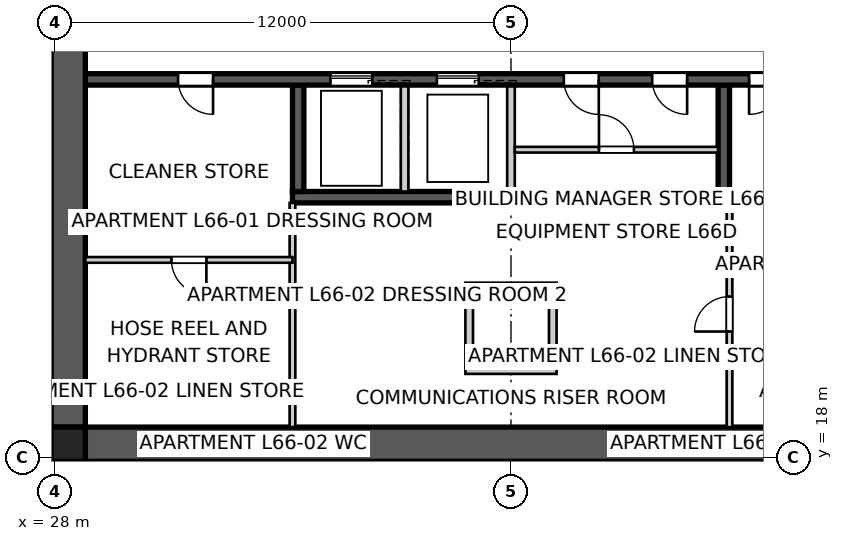
"""IFC4 building model, lengths in metres.
Left out: names, types, materials, properties, quantities, classifications, styles, units other than length and angle.
Written with IfcOpenShell. Run it as: python <this file> out.ifc"""

import sys

from ifc_helpers import new_model, si_unit, direction, frame, frame_2d, origin, origin_2d, place, context, subcontext, project, spatial, polyline, rectangle, outline, extrude, element, fill, save


model = new_model("IFC4")
c1 = context("Model", 3, precision=1e-05, world=origin(), true_north=direction((0.0, 1.0)))
c2 = subcontext(c1, "Body", "Model", "MODEL_VIEW")
j1 = project(units=[si_unit("LENGTHUNIT", "METRE"), si_unit("PLANEANGLEUNIT", "RADIAN")], contexts=[c1])
p1 = place(None, origin())
s1 = spatial("IfcSite", under=j1, at=p1, CompositionType="ELEMENT")
p2 = place(p1, origin())
s2 = spatial("IfcBuilding", under=s1, at=p2, CompositionType="ELEMENT")
p3 = place(p2, frame((0.0, 0.0, 240.4)))
s3 = spatial("IfcBuildingStorey", under=s2, at=p3, CompositionType="ELEMENT", Elevation=240.4)
p4 = place(p3, frame((51.2, 18.35, 0.0), z_axis=(0.0, 0.0, 1.0), x_axis=(-1.0, 0.0, 0.0)))
e1 = element("IfcWall", 1, at=p4, inside=s3, PredefinedType="SHEAR", context=c2, shape_type="SweptSolid", body=[
    extrude(outline(polyline([(0.0, -0.45), (22.4, -0.45), (22.4, -0.025), (22.85, -0.025), (22.85, 0.025), (22.4, 0.025), (22.4, 0.45), (0.0, 0.45), (0.0, 0.025), (-0.45, 0.025), (-0.45, -0.025), (0.0, -0.025), (0.0, -0.45)])), origin(), (0.0, 0.0, 1.0), 3.4),
])
p5 = place(p3, frame((28.35, 41.2, 0.0), z_axis=(0.0, 0.0, 1.0), x_axis=(0.0, -1.0, 0.0)))
e2 = element("IfcWall", 2, at=p5, inside=s3, PredefinedType="SHEAR", context=c2, shape_type="SweptSolid", body=[
    extrude(outline(polyline([(0.0, -0.45), (22.4, -0.45), (22.4, -0.025), (22.85, -0.025), (22.85, 0.025), (22.4, 0.025), (22.4, 0.45), (0.0, 0.45), (0.0, 0.025), (-0.45, 0.025), (-0.45, -0.025), (0.0, -0.025), (0.0, -0.45)])), origin(), (0.0, 0.0, 1.0), 3.4),
])
p6 = place(p5, frame((11.14, 0.0, 0.0)))
e3 = element("IfcOpeningElement", 3, at=p6, cuts=e2, PredefinedType="OPENING", context=c2, shape_type="SweptSolid", body=[
    extrude(rectangle(XDim=1.02, YDim=2.4, at=frame_2d((0.51, 1.2))), frame((0.0, 0.46, 0.0), z_axis=(0.0, -1.0, 0.0), x_axis=(1.0, 0.0, 0.0)), (0.0, 0.0, 1.0), 0.92),
])
p7 = place(p3, frame((51.2, 27.95, 0.0), z_axis=(0.0, 0.0, 1.0), x_axis=(-1.0, 0.0, 0.0)))
e4 = element("IfcWall", 4, at=p7, inside=s3, PredefinedType="SHEAR", context=c2, shape_type="SweptSolid", body=[
    extrude(rectangle(XDim=22.4, YDim=0.3, at=frame_2d((11.2, 0.0))), origin(), (0.0, 0.0, 1.0), 3.4),
])
p8 = place(p7, frame((19.04, 0.0, 0.0)))
e5 = element("IfcOpeningElement", 5, at=p8, cuts=e4, PredefinedType="OPENING", context=c2, shape_type="SweptSolid", body=[
    extrude(rectangle(XDim=0.92, YDim=2.1, at=frame_2d((0.46, 1.05))), frame((0.0, 0.16, 0.0), z_axis=(0.0, -1.0, 0.0), x_axis=(1.0, 0.0, 0.0)), (0.0, 0.0, 1.0), 0.32),
])
p9 = place(p7, frame((1.265, 0.0, 0.0)))
e6 = element("IfcOpeningElement", 6, at=p9, cuts=e4, PredefinedType="OPENING", context=c2, shape_type="SweptSolid", body=[
    extrude(rectangle(XDim=1.02, YDim=2.1, at=frame_2d((0.51, 1.05))), frame((0.0, 0.16, 0.0), z_axis=(0.0, -1.0, 0.0), x_axis=(1.0, 0.0, 0.0)), (0.0, 0.0, 1.0), 0.32),
])
p10 = place(p7, frame((4.015, 0.0, 0.0)))
e7 = element("IfcOpeningElement", 7, at=p10, cuts=e4, PredefinedType="OPENING", context=c2, shape_type="SweptSolid", body=[
    extrude(rectangle(XDim=0.92, YDim=2.1, at=frame_2d((0.46, 1.05))), frame((0.0, 0.16, 0.0), z_axis=(0.0, -1.0, 0.0), x_axis=(1.0, 0.0, 0.0)), (0.0, 0.0, 1.0), 0.32),
])
p11 = place(p7, frame((8.89, 0.0, 0.0)))
e8 = element("IfcOpeningElement", 8, at=p11, cuts=e4, PredefinedType="OPENING", context=c2, shape_type="SweptSolid", body=[
    extrude(rectangle(XDim=0.92, YDim=2.1, at=frame_2d((0.46, 1.05))), frame((0.0, 0.16, 0.0), z_axis=(0.0, -1.0, 0.0), x_axis=(1.0, 0.0, 0.0)), (0.0, 0.0, 1.0), 0.32),
])
p12 = place(p7, frame((6.565, 0.0, 0.0)))
e9 = element("IfcOpeningElement", 9, at=p12, cuts=e4, PredefinedType="OPENING", context=c2, shape_type="SweptSolid", body=[
    extrude(rectangle(XDim=0.92, YDim=2.1, at=frame_2d((0.46, 1.05))), frame((0.0, 0.16, 0.0), z_axis=(0.0, -1.0, 0.0), x_axis=(1.0, 0.0, 0.0)), (0.0, 0.0, 1.0), 0.32),
])
p13 = place(p7, frame((12.05, 0.0, 0.0)))
e10 = element("IfcOpeningElement", 10, at=p13, cuts=e4, PredefinedType="OPENING", context=c2, shape_type="SweptSolid", body=[
    extrude(rectangle(XDim=1.1, YDim=2.1, at=frame_2d((0.55, 1.05))), frame((0.0, 0.16, 0.0), z_axis=(0.0, -1.0, 0.0), x_axis=(1.0, 0.0, 0.0)), (0.0, 0.0, 1.0), 0.32),
])
p14 = place(p7, frame((14.85, 0.0, 0.0)))
e11 = element("IfcOpeningElement", 11, at=p14, cuts=e4, PredefinedType="OPENING", context=c2, shape_type="SweptSolid", body=[
    extrude(rectangle(XDim=1.1, YDim=2.1, at=frame_2d((0.55, 1.05))), frame((0.0, 0.16, 0.0), z_axis=(0.0, -1.0, 0.0), x_axis=(1.0, 0.0, 0.0)), (0.0, 0.0, 1.0), 0.32),
])
p15 = place(p3, frame((45.75, 24.85, 0.0), z_axis=(0.0, 0.0, 1.0), x_axis=(-1.0, 0.0, 0.0)))
e12 = element("IfcWall", 12, at=p15, inside=s3, PredefinedType="SHEAR", context=c2, shape_type="SweptSolid", body=[
    extrude(rectangle(XDim=11.5, YDim=0.3, at=frame_2d((5.75, 0.0))), origin(), (0.0, 0.0, 1.0), 3.4),
])
p16 = place(p3, frame((45.6, 27.8, 0.0), z_axis=(0.0, 0.0, 1.0), x_axis=(0.0, -1.0, 0.0)))
e13 = element("IfcWall", 13, at=p16, inside=s3, PredefinedType="SHEAR", context=c2, shape_type="SweptSolid", body=[
    extrude(rectangle(XDim=2.8, YDim=0.3, at=frame_2d((1.4, 0.0))), origin(), (0.0, 0.0, 1.0), 3.4),
])
for number, where, z_axis, x_axis in (
    (14, (40.0, 27.8, 0.0), (0.0, 0.0, 1.0), (0.0, -1.0, 0.0)),
    (15, (37.2, 27.8, 0.0), (0.0, 0.0, 1.0), (0.0, -1.0, 0.0)),
):
    element("IfcWall", number, at=place(p3, frame(where, z_axis=z_axis, x_axis=x_axis)), inside=s3, PredefinedType="SOLIDWALL", context=c2, shape_type="SweptSolid", body=[
        extrude(rectangle(XDim=2.8, YDim=0.2, at=frame_2d((1.4, 0.0))), origin(), (0.0, 0.0, 1.0), 3.4),
    ])
p17 = place(p3, frame((34.4, 27.8, 0.0), z_axis=(0.0, 0.0, 1.0), x_axis=(0.0, -1.0, 0.0)))
e16 = element("IfcWall", 16, at=p17, inside=s3, PredefinedType="SHEAR", context=c2, shape_type="SweptSolid", body=[
    extrude(rectangle(XDim=2.8, YDim=0.3, at=frame_2d((1.4, 0.0))), origin(), (0.0, 0.0, 1.0), 3.4),
])
for number, where, z_axis, x_axis in (
    (17, (38.9, 22.4, 0.0), (0.0, 0.0, 1.0), (0.0, -1.0, 0.0)),
    (18, (41.1, 22.4, 0.0), (0.0, 0.0, 1.0), (0.0, -1.0, 0.0)),
):
    element("IfcWall", number, at=place(p3, frame(where, z_axis=z_axis, x_axis=x_axis)), inside=s3, PredefinedType="SOLIDWALL", context=c2, shape_type="SweptSolid", body=[
        extrude(rectangle(XDim=2.0, YDim=0.2, at=frame_2d((1.0, 0.0))), origin(), (0.0, 0.0, 1.0), 3.4),
    ])
for number, where, z_axis, x_axis in (
    (19, (38.8, 22.5, 0.0), (0.0, 0.0, 1.0), (1.0, 0.0, 0.0)),
    (20, (38.8, 20.3, 0.0), (0.0, 0.0, 1.0), (1.0, 0.0, 0.0)),
):
    element("IfcWall", number, at=place(p3, frame(where, z_axis=z_axis, x_axis=x_axis)), inside=s3, PredefinedType="SOLIDWALL", context=c2, shape_type="SweptSolid", body=[
        extrude(rectangle(XDim=2.4, YDim=0.2, at=frame_2d((1.2, 0.0))), origin(), (0.0, 0.0, 1.0), 3.4),
    ])
p18 = place(p3, frame((28.35, 18.35, 0.0), z_axis=(0.0, 0.0, 1.0), x_axis=(1.0, 0.0, 0.0)))
e21 = element("IfcColumn", 21, at=p18, inside=s3, PredefinedType="COLUMN", context=c2, shape_type="SweptSolid", body=[
    extrude(rectangle(XDim=0.9, YDim=0.9, at=origin_2d()), origin(), (0.0, 0.0, 1.0), 3.4),
])
p19 = place(p3, frame((22.388, 17.668, 0.0), z_axis=(0.0, 0.0, 1.0), x_axis=(0.819161528122, 0.573562891796, 0.0)))
e22 = element("IfcWall", 22, at=p19, inside=s3, PredefinedType="PARTITIONING", context=c2, shape_type="SweptSolid", body=[
    extrude(rectangle(XDim=6.681, YDim=0.25, at=frame_2d((3.341, 0.0))), origin(), (0.0, 0.0, 1.0), 3.25),
])
p20 = place(p3, frame((45.75, 18.8, 0.0), z_axis=(0.0, 0.0, 1.0), x_axis=(0.0, 1.0, 0.0)))
e23 = element("IfcWall", 23, at=p20, inside=s3, PredefinedType="SOLIDWALL", context=c2, shape_type="SweptSolid", body=[
    extrude(rectangle(XDim=5.95, YDim=0.15, at=frame_2d((2.975, 0.0))), origin(), (0.0, 0.0, 1.0), 3.25),
])
p21 = place(p20, frame((2.515, 0.0, 0.0)))
e24 = element("IfcOpeningElement", 24, at=p21, cuts=e23, PredefinedType="OPENING", context=c2, shape_type="SweptSolid", body=[
    extrude(rectangle(XDim=0.92, YDim=2.1, at=frame_2d((0.46, 1.05))), frame((0.0, 0.085, 0.0), z_axis=(0.0, -1.0, 0.0), x_axis=(1.0, 0.0, 0.0)), (0.0, 0.0, 1.0), 0.17),
])
p22 = place(p3, frame((34.25, 18.8, 0.0), z_axis=(0.0, 0.0, 1.0), x_axis=(0.0, 1.0, 0.0)))
e25 = element("IfcWall", 25, at=p22, inside=s3, PredefinedType="SOLIDWALL", context=c2, shape_type="SweptSolid", body=[
    extrude(rectangle(XDim=5.9, YDim=0.15, at=frame_2d((2.95, 0.0))), origin(), (0.0, 0.0, 1.0), 3.25),
])
p23 = place(p3, frame((34.25, 23.2, 0.0), z_axis=(0.0, 0.0, 1.0), x_axis=(-1.0, 0.0, 0.0)))
e26 = element("IfcWall", 26, at=p23, inside=s3, PredefinedType="SOLIDWALL", context=c2, shape_type="SweptSolid", body=[
    extrude(rectangle(XDim=5.45, YDim=0.15, at=frame_2d((2.725, 0.0))), origin(), (0.0, 0.0, 1.0), 3.25),
])
p24 = place(p23, frame((2.265, 0.0, 0.0)))
e27 = element("IfcOpeningElement", 27, at=p24, cuts=e26, PredefinedType="OPENING", context=c2, shape_type="SweptSolid", body=[
    extrude(rectangle(XDim=0.92, YDim=2.1, at=frame_2d((0.46, 1.05))), frame((0.0, 0.085, 0.0), z_axis=(0.0, -1.0, 0.0), x_axis=(1.0, 0.0, 0.0)), (0.0, 0.0, 1.0), 0.17),
])
p25 = place(p3, frame((40.1, 26.1, 0.0), z_axis=(0.0, 0.0, 1.0), x_axis=(1.0, 0.0, 0.0)))
e28 = element("IfcWall", 28, at=p25, inside=s3, PredefinedType="SOLIDWALL", context=c2, shape_type="SweptSolid", body=[
    extrude(rectangle(XDim=5.35, YDim=0.15, at=frame_2d((2.675, 0.0))), origin(), (0.0, 0.0, 1.0), 3.25),
])
p26 = place(p25, frame((2.215, 0.0, 0.0)))
e29 = element("IfcOpeningElement", 29, at=p26, cuts=e28, PredefinedType="OPENING", context=c2, shape_type="SweptSolid", body=[
    extrude(rectangle(XDim=0.92, YDim=2.1, at=frame_2d((0.46, 1.05))), frame((0.0, 0.085, 0.0), z_axis=(0.0, -1.0, 0.0), x_axis=(1.0, 0.0, 0.0)), (0.0, 0.0, 1.0), 0.17),
])
p27 = place(p8, origin())
e30 = element("IfcDoor", 30, at=p27, inside=s3, OperationType="SINGLE_SWING_LEFT", PredefinedType="DOOR", context=c2, shape_type="SweptSolid", body=[
    extrude(rectangle(XDim=0.92, YDim=2.1, at=frame_2d((0.46, 1.05))), frame((0.0, 0.025, 0.0), z_axis=(0.0, -1.0, 0.0), x_axis=(1.0, 0.0, 0.0)), (0.0, 0.0, 1.0), 0.05),
])
fill(e5, e30)
p28 = place(p10, origin())
e31 = element("IfcDoor", 31, at=p28, inside=s3, OperationType="SINGLE_SWING_RIGHT", PredefinedType="DOOR", context=c2, shape_type="SweptSolid", body=[
    extrude(rectangle(XDim=0.92, YDim=2.1, at=frame_2d((0.46, 1.05))), frame((0.0, 0.025, 0.0), z_axis=(0.0, -1.0, 0.0), x_axis=(1.0, 0.0, 0.0)), (0.0, 0.0, 1.0), 0.05),
])
fill(e7, e31)
p29 = place(p24, origin())
e32 = element("IfcDoor", 32, at=p29, inside=s3, OperationType="SINGLE_SWING_LEFT", PredefinedType="DOOR", context=c2, shape_type="SweptSolid", body=[
    extrude(rectangle(XDim=0.92, YDim=2.1, at=frame_2d((0.46, 1.05))), frame((0.0, 0.025, 0.0), z_axis=(0.0, -1.0, 0.0), x_axis=(1.0, 0.0, 0.0)), (0.0, 0.0, 1.0), 0.05),
])
fill(e27, e32)
p30 = place(p21, origin())
e33 = element("IfcDoor", 33, at=p30, inside=s3, OperationType="SINGLE_SWING_LEFT", PredefinedType="DOOR", context=c2, shape_type="SweptSolid", body=[
    extrude(rectangle(XDim=0.92, YDim=2.1, at=frame_2d((0.46, 1.05))), frame((0.0, 0.025, 0.0), z_axis=(0.0, -1.0, 0.0), x_axis=(1.0, 0.0, 0.0)), (0.0, 0.0, 1.0), 0.05),
])
fill(e24, e33)
p31 = place(p11, origin())
e34 = element("IfcDoor", 34, at=p31, inside=s3, OperationType="SINGLE_SWING_LEFT", PredefinedType="DOOR", context=c2, shape_type="SweptSolid", body=[
    extrude(rectangle(XDim=0.92, YDim=2.1, at=frame_2d((0.46, 1.05))), frame((0.0, 0.025, 0.0), z_axis=(0.0, -1.0, 0.0), x_axis=(1.0, 0.0, 0.0)), (0.0, 0.0, 1.0), 0.05),
])
fill(e8, e34)
p32 = place(p12, origin())
e35 = element("IfcDoor", 35, at=p32, inside=s3, OperationType="SINGLE_SWING_LEFT", PredefinedType="DOOR", context=c2, shape_type="SweptSolid", body=[
    extrude(rectangle(XDim=0.92, YDim=2.1, at=frame_2d((0.46, 1.05))), frame((0.0, 0.025, 0.0), z_axis=(0.0, -1.0, 0.0), x_axis=(1.0, 0.0, 0.0)), (0.0, 0.0, 1.0), 0.05),
])
fill(e9, e35)
p33 = place(p26, origin())
e36 = element("IfcDoor", 36, at=p33, inside=s3, OperationType="SINGLE_SWING_LEFT", PredefinedType="DOOR", context=c2, shape_type="SweptSolid", body=[
    extrude(rectangle(XDim=0.92, YDim=2.1, at=frame_2d((0.46, 1.05))), frame((0.0, 0.025, 0.0), z_axis=(0.0, -1.0, 0.0), x_axis=(1.0, 0.0, 0.0)), (0.0, 0.0, 1.0), 0.05),
])
fill(e29, e36)
p34 = place(p13, origin())
e37 = element("IfcDoor", 37, at=p34, inside=s3, OperationType="SLIDING_TO_LEFT", PredefinedType="DOOR", context=c2, shape_type="SweptSolid", body=[
    extrude(rectangle(XDim=1.1, YDim=2.1, at=frame_2d((0.55, 1.05))), frame((0.0, 0.025, 0.0), z_axis=(0.0, -1.0, 0.0), x_axis=(1.0, 0.0, 0.0)), (0.0, 0.0, 1.0), 0.05),
])
fill(e10, e37)
p35 = place(p14, origin())
e38 = element("IfcDoor", 38, at=p35, inside=s3, OperationType="SLIDING_TO_LEFT", PredefinedType="DOOR", context=c2, shape_type="SweptSolid", body=[
    extrude(rectangle(XDim=1.1, YDim=2.1, at=frame_2d((0.55, 1.05))), frame((0.0, 0.025, 0.0), z_axis=(0.0, -1.0, 0.0), x_axis=(1.0, 0.0, 0.0)), (0.0, 0.0, 1.0), 0.05),
])
fill(e11, e38)
save(model, sys.argv[1])
